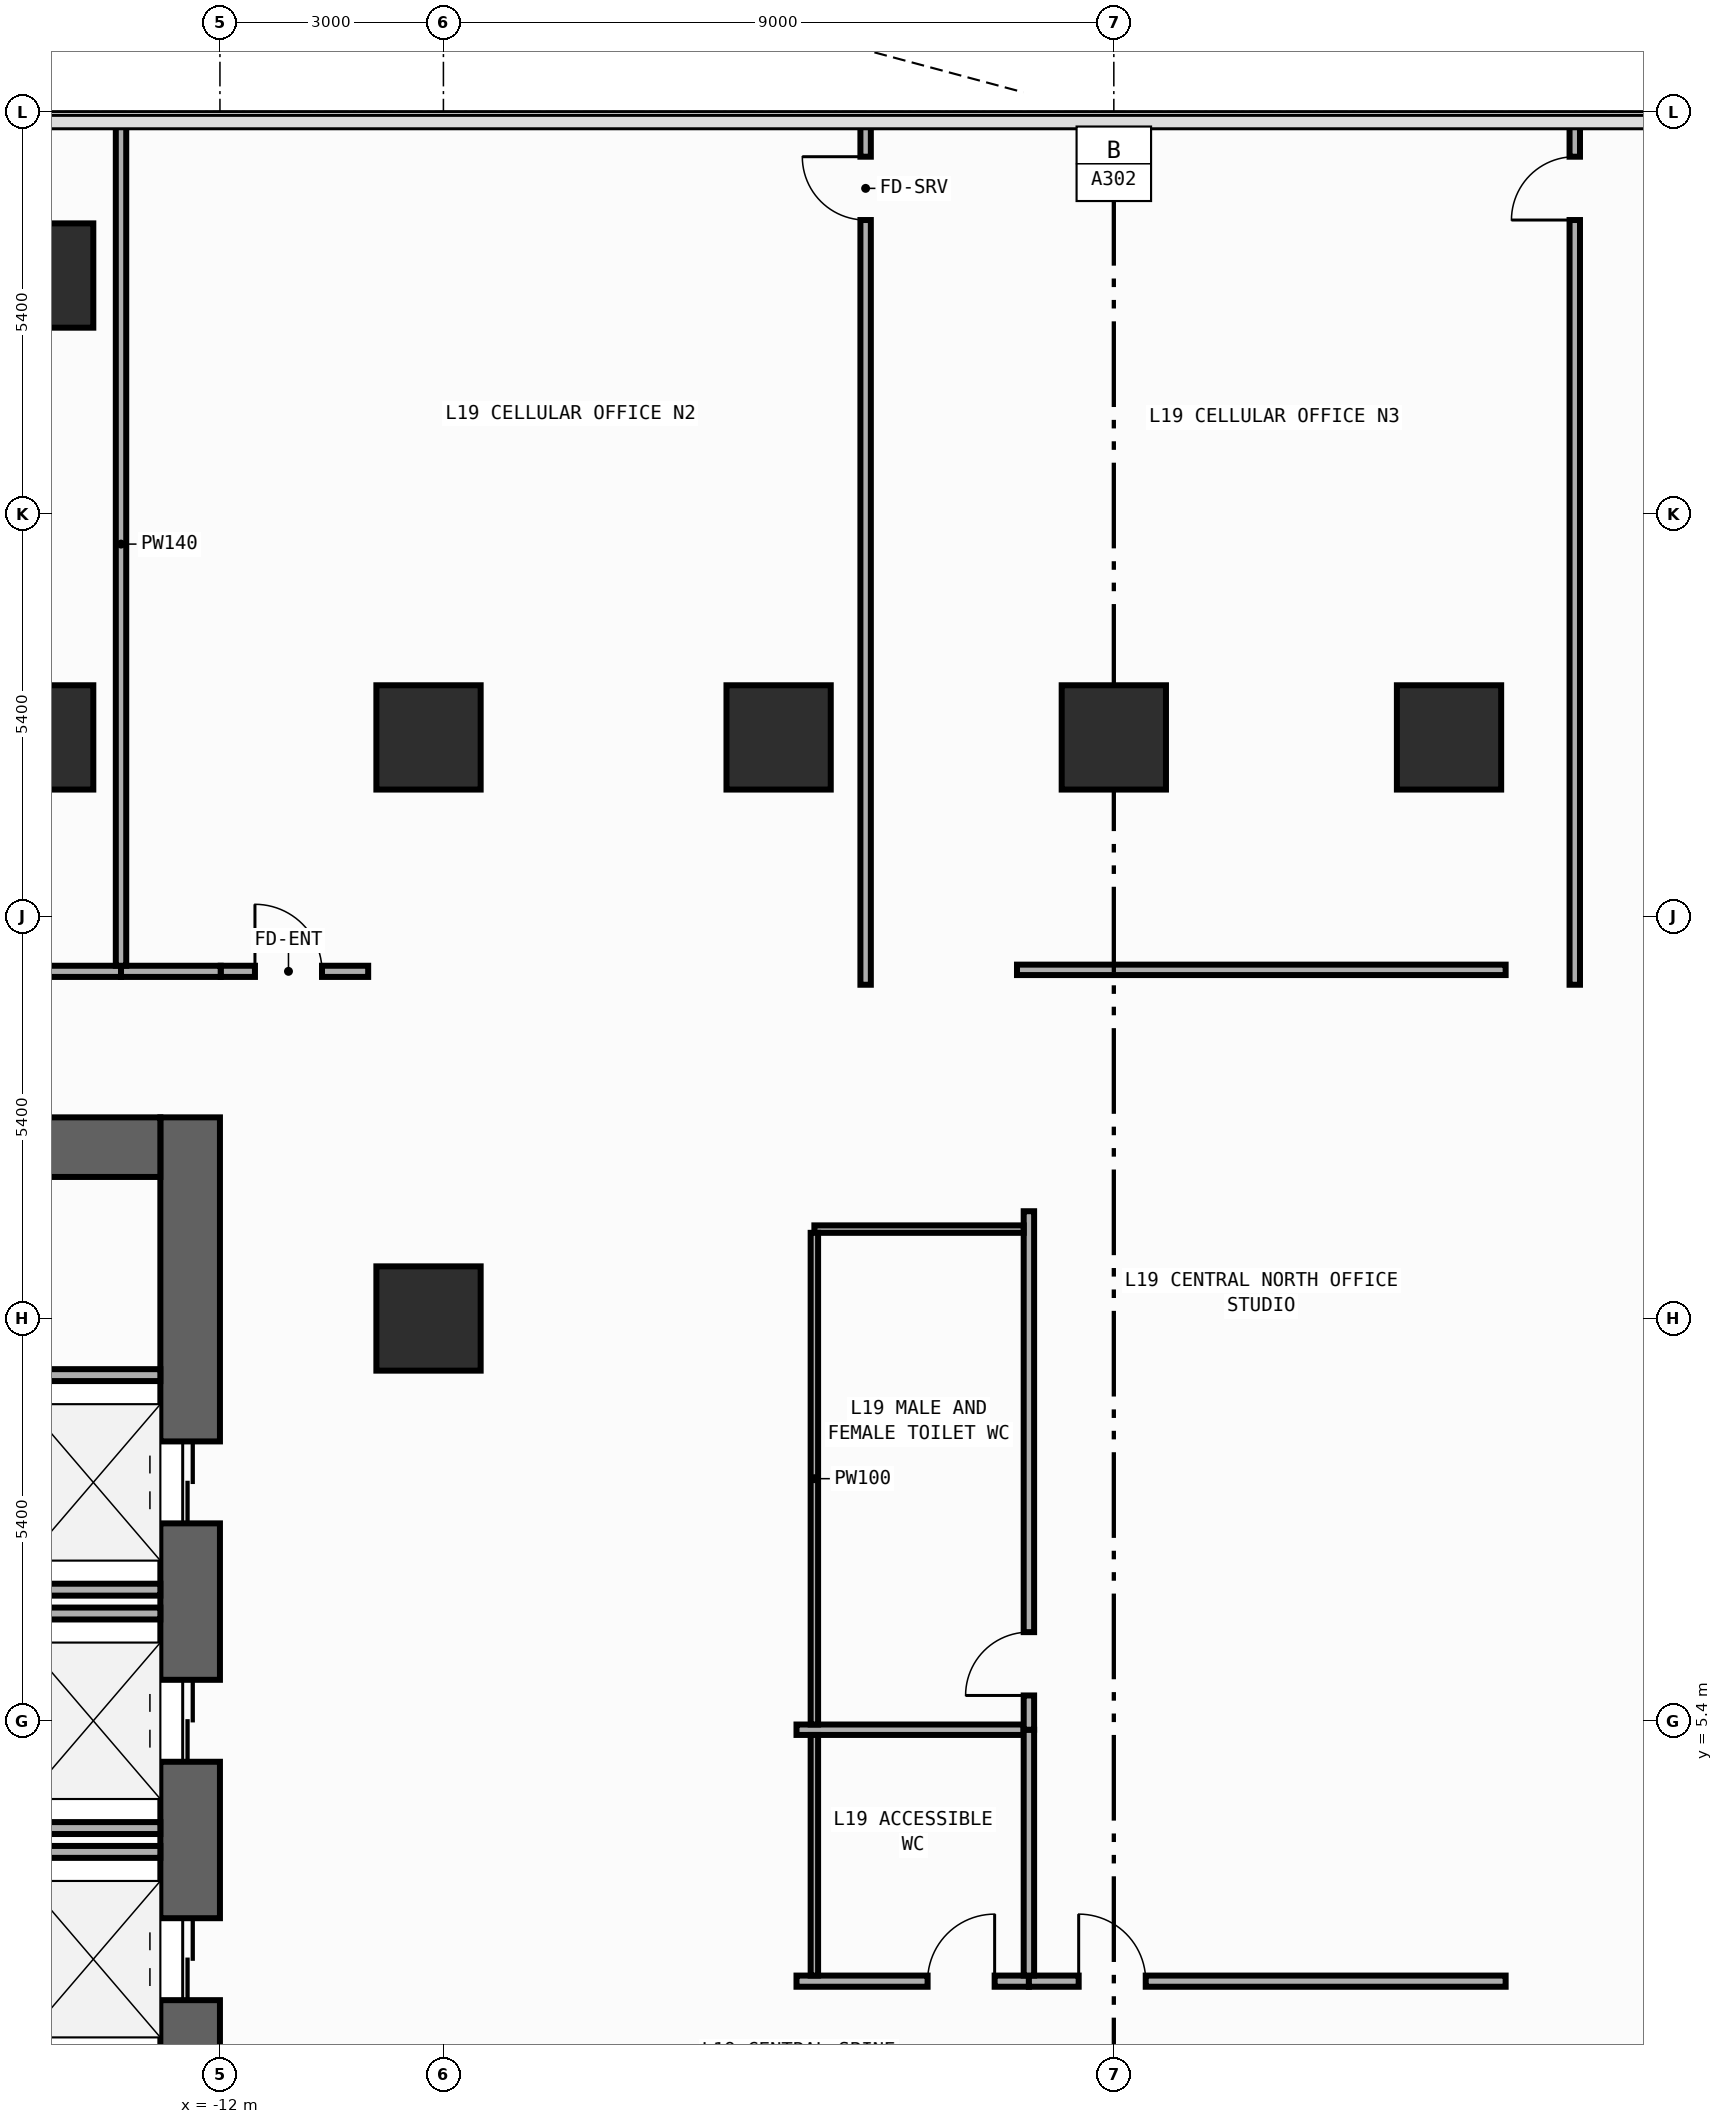
"""IFC4 building model, lengths in metres.
Left out: names, types, materials, properties, quantities, classifications, styles, units other than length and angle.
Written with IfcOpenShell. Run it as: python <this file> out.ifc"""

import sys

from ifc_helpers import new_model, si_unit, direction, frame, frame_2d, origin, origin_2d, place, context, subcontext, project, spatial, rectangle, extrude, element, fill, save


model = new_model("IFC4")
c1 = context("Model", 3, precision=1e-05, world=origin(), true_north=direction((0.0, 1.0)))
c2 = subcontext(c1, "Body", "Model", "MODEL_VIEW")
j1 = project(units=[si_unit("LENGTHUNIT", "METRE"), si_unit("PLANEANGLEUNIT", "RADIAN")], contexts=[c1])
p1 = place(None, origin())
s1 = spatial("IfcSite", under=j1, at=p1, CompositionType="ELEMENT")
p2 = place(p1, origin())
s2 = spatial("IfcBuilding", under=s1, at=p2, CompositionType="ELEMENT")
p3 = place(p2, frame((0.0, 0.0, 80.6)))
s3 = spatial("IfcBuildingStorey", under=s2, at=p3, CompositionType="ELEMENT", Elevation=80.6)
p4 = place(p3, frame((-12.4, -13.5, 0.0), z_axis=(0.0, 0.0, 1.0), x_axis=(0.0, 1.0, 0.0)))
e1 = element("IfcWall", 1, at=p4, inside=s3, PredefinedType="SHEAR", context=c2, shape_type="SweptSolid", body=[
    extrude(rectangle(XDim=27.0, YDim=0.8, at=frame_2d((13.5, 0.0))), origin(), (0.0, 0.0, 1.0), 3.85),
])
p5 = place(p4, frame((21.55, 0.0, 0.0)))
e2 = element("IfcOpeningElement", 2, at=p5, cuts=e1, PredefinedType="OPENING", context=c2, shape_type="SweptSolid", body=[
    extrude(rectangle(XDim=1.1, YDim=2.2, at=frame_2d((0.55, 1.1))), frame((0.0, 0.41, 0.0), z_axis=(0.0, -1.0, 0.0), x_axis=(1.0, 0.0, 0.0)), (0.0, 0.0, 1.0), 0.82),
])
p6 = place(p4, frame((18.35, 0.0, 0.0)))
e3 = element("IfcOpeningElement", 3, at=p6, cuts=e1, PredefinedType="OPENING", context=c2, shape_type="SweptSolid", body=[
    extrude(rectangle(XDim=1.1, YDim=2.2, at=frame_2d((0.55, 1.1))), frame((0.0, 0.41, 0.0), z_axis=(0.0, -1.0, 0.0), x_axis=(1.0, 0.0, 0.0)), (0.0, 0.0, 1.0), 0.82),
])
p7 = place(p4, frame((15.15, 0.0, 0.0)))
e4 = element("IfcOpeningElement", 4, at=p7, cuts=e1, PredefinedType="OPENING", context=c2, shape_type="SweptSolid", body=[
    extrude(rectangle(XDim=1.1, YDim=2.2, at=frame_2d((0.55, 1.1))), frame((0.0, 0.41, 0.0), z_axis=(0.0, -1.0, 0.0), x_axis=(1.0, 0.0, 0.0)), (0.0, 0.0, 1.0), 0.82),
])
p8 = place(p4, frame((10.35, 0.0, 0.0)))
e5 = element("IfcOpeningElement", 5, at=p8, cuts=e1, PredefinedType="OPENING", context=c2, shape_type="SweptSolid", body=[
    extrude(rectangle(XDim=1.1, YDim=2.2, at=frame_2d((0.55, 1.1))), frame((0.0, 0.41, 0.0), z_axis=(0.0, -1.0, 0.0), x_axis=(1.0, 0.0, 0.0)), (0.0, 0.0, 1.0), 0.82),
])
p9 = place(p4, frame((7.15, 0.0, 0.0)))
e6 = element("IfcOpeningElement", 6, at=p9, cuts=e1, PredefinedType="OPENING", context=c2, shape_type="SweptSolid", body=[
    extrude(rectangle(XDim=1.1, YDim=2.2, at=frame_2d((0.55, 1.1))), frame((0.0, 0.41, 0.0), z_axis=(0.0, -1.0, 0.0), x_axis=(1.0, 0.0, 0.0)), (0.0, 0.0, 1.0), 0.82),
])
p10 = place(p4, frame((3.95, 0.0, 0.0)))
e7 = element("IfcOpeningElement", 7, at=p10, cuts=e1, PredefinedType="OPENING", context=c2, shape_type="SweptSolid", body=[
    extrude(rectangle(XDim=1.1, YDim=2.2, at=frame_2d((0.55, 1.1))), frame((0.0, 0.41, 0.0), z_axis=(0.0, -1.0, 0.0), x_axis=(1.0, 0.0, 0.0)), (0.0, 0.0, 1.0), 0.82),
])
p11 = place(p4, frame((12.725, 0.0, 0.0)))
e8 = element("IfcOpeningElement", 8, at=p11, cuts=e1, PredefinedType="OPENING", context=c2, shape_type="SweptSolid", body=[
    extrude(rectangle(XDim=1.15, YDim=2.2, at=frame_2d((0.575, 1.1))), frame((0.0, 0.41, 0.0), z_axis=(0.0, -1.0, 0.0), x_axis=(1.0, 0.0, 0.0)), (0.0, 0.0, 1.0), 0.82),
])
p12 = place(p4, frame((1.625, 0.0, 0.0)))
e9 = element("IfcOpeningElement", 9, at=p12, cuts=e1, PredefinedType="OPENING", context=c2, shape_type="SweptSolid", body=[
    extrude(rectangle(XDim=0.85, YDim=2.1, at=frame_2d((0.425, 1.05))), frame((0.0, 0.41, 0.0), z_axis=(0.0, -1.0, 0.0), x_axis=(1.0, 0.0, 0.0)), (0.0, 0.0, 1.0), 0.82),
])
p13 = place(p3, frame((-19.6, 13.1, 0.0), z_axis=(0.0, 0.0, 1.0), x_axis=(1.0, 0.0, 0.0)))
e10 = element("IfcWall", 10, at=p13, inside=s3, PredefinedType="SHEAR", context=c2, shape_type="SweptSolid", body=[
    extrude(rectangle(XDim=6.8, YDim=0.8, at=frame_2d((3.4, 0.0))), origin(), (0.0, 0.0, 1.0), 3.85),
])
for number, where, z_axis, x_axis in (
    (11, (-9.2, 10.8, 0.0), (0.0, 0.0, 1.0), (1.0, 0.0, 0.0)),
    (12, (-9.2, 18.6, 0.0), (0.0, 0.0, 1.0), (1.0, 0.0, 0.0)),
    (13, (-14.4, 18.6, 0.0), (0.0, 0.0, 1.0), (1.0, 0.0, 0.0)),
    (14, (-4.5, 18.6, 0.0), (0.0, 0.0, 1.0), (1.0, 0.0, 0.0)),
    (15, (0.0, 18.6, 0.0), (0.0, 0.0, 1.0), (1.0, 0.0, 0.0)),
    (16, (4.5, 18.6, 0.0), (0.0, 0.0, 1.0), (1.0, 0.0, 0.0)),
    (17, (-14.4, 24.8, 0.0), (0.0, 0.0, 1.0), (1.0, 0.0, 0.0)),
):
    element("IfcColumn", number, at=place(p3, frame(where, z_axis=z_axis, x_axis=x_axis)), inside=s3, PredefinedType="COLUMN", context=c2, shape_type="SweptSolid", body=[
        extrude(rectangle(XDim=1.4, YDim=1.4, at=origin_2d()), origin(), (0.0, 0.0, 1.0), 4.2),
    ])
for number, where, z_axis, x_axis in (
    (18, (-14.99, 7.16, 0.0), (0.0, 0.0, 1.0), (1.0, 0.0, 0.0)),
    (19, (-14.99, 10.04, 0.0), (0.0, 0.0, 1.0), (1.0, 0.0, 0.0)),
    (20, (-14.99, 3.96, 0.0), (0.0, 0.0, 1.0), (1.0, 0.0, 0.0)),
    (21, (-14.99, 6.84, 0.0), (0.0, 0.0, 1.0), (1.0, 0.0, 0.0)),
    (22, (-14.99, 3.64, 0.0), (0.0, 0.0, 1.0), (1.0, 0.0, 0.0)),
):
    element("IfcWall", number, at=place(p3, frame(where, z_axis=z_axis, x_axis=x_axis)), inside=s3, PredefinedType="STANDARD", context=c2, shape_type="SweptSolid", body=[
        extrude(rectangle(XDim=2.19, YDim=0.16, at=frame_2d((1.095, 0.0))), origin(), (0.0, 0.0, 1.0), 3.85),
    ])
p14 = place(p3, frame((-11.99, 15.46, 0.0), z_axis=(0.0, 0.0, 1.0), x_axis=(1.0, 0.0, 0.0)))
e23 = element("IfcWall", 23, at=p14, inside=s3, PredefinedType="PARTITIONING", context=c2, shape_type="SweptSolid", body=[
    extrude(rectangle(XDim=1.98, YDim=0.15, at=frame_2d((0.99, 0.0))), origin(), (0.0, 0.0, 1.0), 3.85),
])
p15 = place(p14, frame((0.46, 0.0, 0.0)))
e24 = element("IfcOpeningElement", 24, at=p15, cuts=e23, PredefinedType="OPENING", context=c2, shape_type="SweptSolid", body=[
    extrude(rectangle(XDim=0.9, YDim=2.15, at=frame_2d((0.45, 1.075))), frame((0.0, 0.085, 0.0), z_axis=(0.0, -1.0, 0.0), x_axis=(1.0, 0.0, 0.0)), (0.0, 0.0, 1.0), 0.17),
])
p16 = place(p3, frame((-4.26, 1.905, 0.0), z_axis=(0.0, 0.0, 1.0), x_axis=(1.0, 0.0, 0.0)))
e25 = element("IfcWall", 25, at=p16, inside=s3, PredefinedType="PARTITIONING", context=c2, shape_type="SweptSolid", body=[
    extrude(rectangle(XDim=3.12, YDim=0.15, at=frame_2d((1.56, 0.0))), origin(), (0.0, 0.0, 1.0), 3.85),
])
p17 = place(p16, frame((1.76, 0.0, 0.0)))
e26 = element("IfcOpeningElement", 26, at=p17, cuts=e25, PredefinedType="OPENING", context=c2, shape_type="SweptSolid", body=[
    extrude(rectangle(XDim=0.9, YDim=2.15, at=frame_2d((0.45, 1.075))), frame((0.0, 0.085, 0.0), z_axis=(0.0, -1.0, 0.0), x_axis=(1.0, 0.0, 0.0)), (0.0, 0.0, 1.0), 0.17),
])
p18 = place(p3, frame((-1.14, 1.905, 0.0), z_axis=(0.0, 0.0, 1.0), x_axis=(1.0, 0.0, 0.0)))
e27 = element("IfcWall", 27, at=p18, inside=s3, PredefinedType="PARTITIONING", context=c2, shape_type="SweptSolid", body=[
    extrude(rectangle(XDim=6.4, YDim=0.15, at=frame_2d((3.2, 0.0))), origin(), (0.0, 0.0, 1.0), 3.85),
])
p19 = place(p18, frame((0.668, 0.0, 0.0)))
e28 = element("IfcOpeningElement", 28, at=p19, cuts=e27, PredefinedType="OPENING", context=c2, shape_type="SweptSolid", body=[
    extrude(rectangle(XDim=0.9, YDim=2.15, at=frame_2d((0.45, 1.075))), frame((0.0, 0.085, 0.0), z_axis=(0.0, -1.0, 0.0), x_axis=(1.0, 0.0, 0.0)), (0.0, 0.0, 1.0), 0.17),
])
p20 = place(p3, frame((-20.64, 15.46, 0.0), z_axis=(0.0, 0.0, 1.0), x_axis=(1.0, 0.0, 0.0)))
e29 = element("IfcWall", 29, at=p20, inside=s3, PredefinedType="PARTITIONING", context=c2, shape_type="SweptSolid", body=[
    extrude(rectangle(XDim=7.312, YDim=0.15, at=frame_2d((3.656, 0.0))), origin(), (0.0, 0.0, 1.0), 3.85),
])
p21 = place(p20, frame((2.698, 0.0, 0.0)))
e30 = element("IfcOpeningElement", 30, at=p21, cuts=e29, PredefinedType="OPENING", context=c2, shape_type="SweptSolid", body=[
    extrude(rectangle(XDim=0.9, YDim=2.15, at=frame_2d((0.45, 1.075))), frame((0.0, 0.085, 0.0), z_axis=(0.0, -1.0, 0.0), x_axis=(1.0, 0.0, 0.0)), (0.0, 0.0, 1.0), 0.17),
])
p22 = place(p3, frame((-13.328, 15.46, 0.0), z_axis=(0.0, 0.0, 1.0), x_axis=(1.0, 0.0, 0.0)))
e31 = element("IfcWall", 31, at=p22, inside=s3, PredefinedType="PARTITIONING", context=c2, shape_type="SweptSolid", body=[
    extrude(rectangle(XDim=1.338, YDim=0.15, at=frame_2d((0.669, 0.0))), origin(), (0.0, 0.0, 1.0), 3.85),
])
p23 = place(p3, frame((-13.328, 15.535, 0.0), z_axis=(0.0, 0.0, 1.0), x_axis=(0.0, 1.0, 0.0)))
e32 = element("IfcWall", 32, at=p23, inside=s3, PredefinedType="PARTITIONING", context=c2, shape_type="SweptSolid", body=[
    extrude(rectangle(XDim=11.32, YDim=0.14, at=frame_2d((5.66, 0.0))), origin(), (0.0, 0.0, 1.0), 3.85),
])
p24 = place(p3, frame((-3.332, 15.28, 0.0), z_axis=(0.0, 0.0, 1.0), x_axis=(0.0, 1.0, 0.0)))
e33 = element("IfcWall", 33, at=p24, inside=s3, PredefinedType="PARTITIONING", context=c2, shape_type="SweptSolid", body=[
    extrude(rectangle(XDim=11.575, YDim=0.14, at=frame_2d((5.788, 0.0))), origin(), (0.0, 0.0, 1.0), 3.85),
])
p25 = place(p24, frame((10.265, 0.0, 0.0)))
e34 = element("IfcOpeningElement", 34, at=p25, cuts=e33, PredefinedType="OPENING", context=c2, shape_type="SweptSolid", body=[
    extrude(rectangle(XDim=0.85, YDim=2.1, at=frame_2d((0.425, 1.05))), frame((0.0, 0.08, 0.0), z_axis=(0.0, -1.0, 0.0), x_axis=(1.0, 0.0, 0.0)), (0.0, 0.0, 1.0), 0.16),
])
p26 = place(p3, frame((6.188, 15.28, 0.0), z_axis=(0.0, 0.0, 1.0), x_axis=(0.0, 1.0, 0.0)))
e35 = element("IfcWall", 35, at=p26, inside=s3, PredefinedType="PARTITIONING", context=c2, shape_type="SweptSolid", body=[
    extrude(rectangle(XDim=11.575, YDim=0.14, at=frame_2d((5.788, 0.0))), origin(), (0.0, 0.0, 1.0), 3.85),
])
p27 = place(p26, frame((10.265, 0.0, 0.0)))
e36 = element("IfcOpeningElement", 36, at=p27, cuts=e35, PredefinedType="OPENING", context=c2, shape_type="SweptSolid", body=[
    extrude(rectangle(XDim=0.85, YDim=2.1, at=frame_2d((0.425, 1.05))), frame((0.0, 0.08, 0.0), z_axis=(0.0, -1.0, 0.0), x_axis=(1.0, 0.0, 0.0)), (0.0, 0.0, 1.0), 0.16),
])
p28 = place(p3, frame((-1.3, 15.48, 0.0), z_axis=(0.0, 0.0, 1.0), x_axis=(1.0, 0.0, 0.0)))
e37 = element("IfcWall", 37, at=p28, inside=s3, PredefinedType="PARTITIONING", context=c2, shape_type="SweptSolid", body=[
    extrude(rectangle(XDim=6.56, YDim=0.14, at=frame_2d((3.28, 0.0))), origin(), (0.0, 0.0, 1.0), 3.85),
])
p29 = place(p3, frame((-4.26, 5.28, 0.0), z_axis=(0.0, 0.0, 1.0), x_axis=(1.0, 0.0, 0.0)))
e38 = element("IfcWall", 38, at=p29, inside=s3, PredefinedType="PARTITIONING", context=c2, shape_type="SweptSolid", body=[
    extrude(rectangle(XDim=3.05, YDim=0.14, at=frame_2d((1.525, 0.0))), origin(), (0.0, 0.0, 1.0), 3.85),
])
p30 = place(p3, frame((-1.14, 1.98, 0.0), z_axis=(0.0, 0.0, 1.0), x_axis=(0.0, 1.0, 0.0)))
e39 = element("IfcWall", 39, at=p30, inside=s3, PredefinedType="PARTITIONING", context=c2, shape_type="SweptSolid", body=[
    extrude(rectangle(XDim=3.3, YDim=0.14, at=frame_2d((1.65, 0.0))), origin(), (0.0, 0.0, 1.0), 3.85),
])
p31 = place(p3, frame((-1.14, 5.28, 0.0), z_axis=(0.0, 0.0, 1.0), x_axis=(0.0, 1.0, 0.0)))
e40 = element("IfcWall", 40, at=p31, inside=s3, PredefinedType="PARTITIONING", context=c2, shape_type="SweptSolid", body=[
    extrude(rectangle(XDim=6.96, YDim=0.14, at=frame_2d((3.48, 0.0))), origin(), (0.0, 0.0, 1.0), 3.85),
])
p32 = place(p31, frame((0.46, 0.0, 0.0)))
e41 = element("IfcOpeningElement", 41, at=p32, cuts=e40, PredefinedType="OPENING", context=c2, shape_type="SweptSolid", body=[
    extrude(rectangle(XDim=0.85, YDim=2.1, at=frame_2d((0.425, 1.05))), frame((0.0, 0.08, 0.0), z_axis=(0.0, -1.0, 0.0), x_axis=(1.0, 0.0, 0.0)), (0.0, 0.0, 1.0), 0.16),
])
p33 = place(p3, frame((-4.02, 1.98, 0.0), z_axis=(0.0, 0.0, 1.0), x_axis=(0.0, 1.0, 0.0)))
e42 = element("IfcWall", 42, at=p33, inside=s3, PredefinedType="PARTITIONING", context=c2, shape_type="SweptSolid", body=[
    extrude(rectangle(XDim=3.23, YDim=0.1, at=frame_2d((1.615, 0.0))), origin(), (0.0, 0.0, 1.0), 3.85),
])
p34 = place(p3, frame((-4.02, 12.0, 0.0), z_axis=(0.0, 0.0, 1.0), x_axis=(1.0, 0.0, 0.0)))
e43 = element("IfcWall", 43, at=p34, inside=s3, PredefinedType="PARTITIONING", context=c2, shape_type="SweptSolid", body=[
    extrude(rectangle(XDim=2.81, YDim=0.1, at=frame_2d((1.405, 0.0))), origin(), (0.0, 0.0, 1.0), 3.85),
])
p35 = place(p3, frame((-4.02, 5.35, 0.0), z_axis=(0.0, 0.0, 1.0), x_axis=(0.0, 1.0, 0.0)))
e44 = element("IfcWall", 44, at=p35, inside=s3, PredefinedType="PARTITIONING", context=c2, shape_type="SweptSolid", body=[
    extrude(rectangle(XDim=6.6, YDim=0.1, at=frame_2d((3.3, 0.0))), origin(), (0.0, 0.0, 1.0), 3.85),
])
p36 = place(p5, origin())
e45 = element("IfcDoor", 45, at=p36, inside=s3, OperationType="DOUBLE_DOOR_SLIDING", PredefinedType="DOOR", context=c2, shape_type="SweptSolid", body=[
    extrude(rectangle(XDim=1.1, YDim=2.2, at=frame_2d((0.55, 1.1))), frame((0.0, 0.025, 0.0), z_axis=(0.0, -1.0, 0.0), x_axis=(1.0, 0.0, 0.0)), (0.0, 0.0, 1.0), 0.05),
])
fill(e2, e45)
p37 = place(p6, origin())
e46 = element("IfcDoor", 46, at=p37, inside=s3, OperationType="DOUBLE_DOOR_SLIDING", PredefinedType="DOOR", context=c2, shape_type="SweptSolid", body=[
    extrude(rectangle(XDim=1.1, YDim=2.2, at=frame_2d((0.55, 1.1))), frame((0.0, 0.025, 0.0), z_axis=(0.0, -1.0, 0.0), x_axis=(1.0, 0.0, 0.0)), (0.0, 0.0, 1.0), 0.05),
])
fill(e3, e46)
p38 = place(p7, origin())
e47 = element("IfcDoor", 47, at=p38, inside=s3, OperationType="DOUBLE_DOOR_SLIDING", PredefinedType="DOOR", context=c2, shape_type="SweptSolid", body=[
    extrude(rectangle(XDim=1.1, YDim=2.2, at=frame_2d((0.55, 1.1))), frame((0.0, 0.025, 0.0), z_axis=(0.0, -1.0, 0.0), x_axis=(1.0, 0.0, 0.0)), (0.0, 0.0, 1.0), 0.05),
])
fill(e4, e47)
p39 = place(p15, origin())
e48 = element("IfcDoor", 48, at=p39, inside=s3, OperationType="SINGLE_SWING_LEFT", PredefinedType="DOOR", context=c2, shape_type="SweptSolid", body=[
    extrude(rectangle(XDim=0.9, YDim=2.15, at=frame_2d((0.45, 1.075))), frame((0.0, 0.025, 0.0), z_axis=(0.0, -1.0, 0.0), x_axis=(1.0, 0.0, 0.0)), (0.0, 0.0, 1.0), 0.05),
])
fill(e24, e48)
p40 = place(p17, origin())
e49 = element("IfcDoor", 49, at=p40, inside=s3, OperationType="SINGLE_SWING_RIGHT", PredefinedType="DOOR", context=c2, shape_type="SweptSolid", body=[
    extrude(rectangle(XDim=0.9, YDim=2.15, at=frame_2d((0.45, 1.075))), frame((0.0, 0.025, 0.0), z_axis=(0.0, -1.0, 0.0), x_axis=(1.0, 0.0, 0.0)), (0.0, 0.0, 1.0), 0.05),
])
fill(e26, e49)
p41 = place(p19, origin())
e50 = element("IfcDoor", 50, at=p41, inside=s3, OperationType="SINGLE_SWING_LEFT", PredefinedType="DOOR", context=c2, shape_type="SweptSolid", body=[
    extrude(rectangle(XDim=0.9, YDim=2.15, at=frame_2d((0.45, 1.075))), frame((0.0, 0.025, 0.0), z_axis=(0.0, -1.0, 0.0), x_axis=(1.0, 0.0, 0.0)), (0.0, 0.0, 1.0), 0.05),
])
fill(e28, e50)
p42 = place(p25, origin())
e51 = element("IfcDoor", 51, at=p42, inside=s3, OperationType="SINGLE_SWING_RIGHT", PredefinedType="DOOR", context=c2, shape_type="SweptSolid", body=[
    extrude(rectangle(XDim=0.85, YDim=2.1, at=frame_2d((0.425, 1.05))), frame((0.0, 0.025, 0.0), z_axis=(0.0, -1.0, 0.0), x_axis=(1.0, 0.0, 0.0)), (0.0, 0.0, 1.0), 0.05),
])
fill(e34, e51)
p43 = place(p27, origin())
e52 = element("IfcDoor", 52, at=p43, inside=s3, OperationType="SINGLE_SWING_LEFT", PredefinedType="DOOR", context=c2, shape_type="SweptSolid", body=[
    extrude(rectangle(XDim=0.85, YDim=2.1, at=frame_2d((0.425, 1.05))), frame((0.0, 0.025, 0.0), z_axis=(0.0, -1.0, 0.0), x_axis=(1.0, 0.0, 0.0)), (0.0, 0.0, 1.0), 0.05),
])
fill(e36, e52)
p44 = place(p32, origin())
e53 = element("IfcDoor", 53, at=p44, inside=s3, OperationType="SINGLE_SWING_LEFT", PredefinedType="DOOR", context=c2, shape_type="SweptSolid", body=[
    extrude(rectangle(XDim=0.85, YDim=2.1, at=frame_2d((0.425, 1.05))), frame((0.0, 0.025, 0.0), z_axis=(0.0, -1.0, 0.0), x_axis=(1.0, 0.0, 0.0)), (0.0, 0.0, 1.0), 0.05),
])
fill(e41, e53)
save(model, sys.argv[1])
